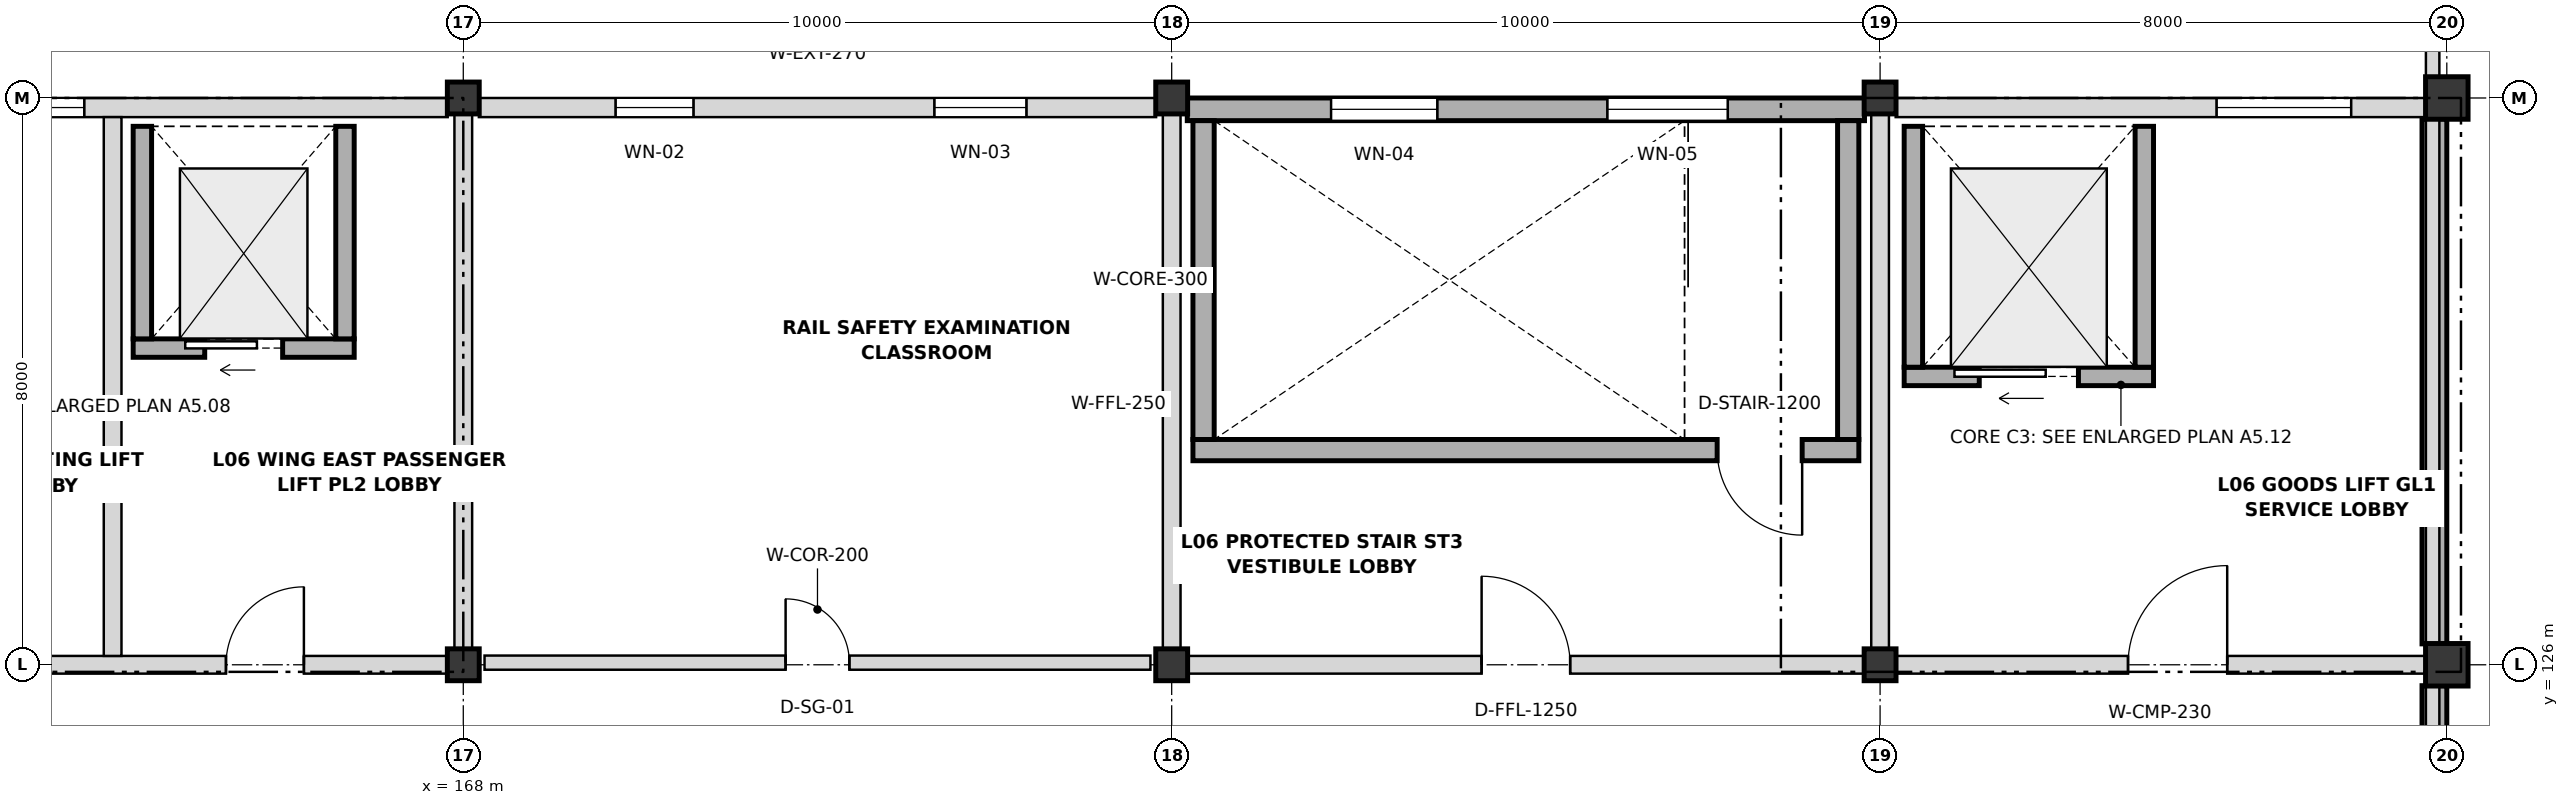
"""IFC4 building model, lengths in metres.
Left out: names, types, materials, properties, quantities, classifications, styles, units other than length and angle.
Written with IfcOpenShell. Run it as: python <this file> out.ifc"""

import sys

from ifc_helpers import new_model, si_unit, direction, frame, frame_2d, origin, origin_2d, place, context, subcontext, project, spatial, rectangle, extrude, element, fill, save


model = new_model("IFC4")
c1 = context("Model", 3, precision=1e-05, world=origin(), true_north=direction((0.0, 1.0)))
c2 = subcontext(c1, "Body", "Model", "MODEL_VIEW")
j1 = project(units=[si_unit("LENGTHUNIT", "METRE"), si_unit("PLANEANGLEUNIT", "RADIAN")], contexts=[c1])
p1 = place(None, origin())
s1 = spatial("IfcSite", under=j1, at=p1, CompositionType="ELEMENT")
p2 = place(p1, origin())
s2 = spatial("IfcBuilding", under=s1, at=p2, CompositionType="ELEMENT")
p3 = place(p2, frame((0.0, 0.0, 27.0)))
s3 = spatial("IfcBuildingStorey", under=s2, at=p3, CompositionType="ELEMENT", Elevation=27.0)
for number, where, z_axis, x_axis in (
    (1, (168.0, 126.0, 0.0), (0.0, 0.0, 1.0), (1.0, 0.0, 0.0)),
    (2, (168.0, 134.0, 0.0), (0.0, 0.0, 1.0), (1.0, 0.0, 0.0)),
    (3, (178.0, 126.0, 0.0), (0.0, 0.0, 1.0), (1.0, 0.0, 0.0)),
    (4, (178.0, 134.0, 0.0), (0.0, 0.0, 1.0), (1.0, 0.0, 0.0)),
    (5, (188.0, 126.0, 0.0), (0.0, 0.0, 1.0), (1.0, 0.0, 0.0)),
    (6, (188.0, 134.0, 0.0), (0.0, 0.0, 1.0), (1.0, 0.0, 0.0)),
):
    element("IfcColumn", number, at=place(p3, frame(where, z_axis=z_axis, x_axis=x_axis)), inside=s3, PredefinedType="COLUMN", context=c2, shape_type="SweptSolid", body=[
        extrude(rectangle(XDim=0.45, YDim=0.45, at=origin_2d()), origin(), (0.0, 0.0, 1.0), 4.2),
    ])
for number, where, z_axis, x_axis in (
    (7, (196.0, 126.0, 0.0), (0.0, 0.0, 1.0), (1.0, 0.0, 0.0)),
    (8, (196.0, 134.0, 0.0), (0.0, 0.0, 1.0), (1.0, 0.0, 0.0)),
):
    element("IfcColumn", number, at=place(p3, frame(where, z_axis=z_axis, x_axis=x_axis)), inside=s3, PredefinedType="COLUMN", context=c2, shape_type="SweptSolid", body=[
        extrude(rectangle(XDim=0.6, YDim=0.6, at=origin_2d()), origin(), (0.0, 0.0, 1.0), 4.2),
    ])
p4 = place(p3, frame((195.825, 125.705, 0.0), z_axis=(0.0, 0.0, 1.0), x_axis=(0.0, -1.0, 0.0)))
e9 = element("IfcWall", 9, at=p4, inside=s3, PredefinedType="SOLIDWALL", context=c2, shape_type="SweptSolid", body=[
    extrude(rectangle(XDim=11.41, YDim=0.35, at=frame_2d((5.705, 0.0))), origin(), (0.0, 0.0, 1.0), 4.2),
])
p5 = place(p3, frame((195.825, 133.705, 0.0), z_axis=(0.0, 0.0, 1.0), x_axis=(0.0, -1.0, 0.0)))
e10 = element("IfcWall", 10, at=p5, inside=s3, PredefinedType="SOLIDWALL", context=c2, shape_type="SweptSolid", body=[
    extrude(rectangle(XDim=7.41, YDim=0.35, at=frame_2d((3.705, 0.0))), origin(), (0.0, 0.0, 1.0), 4.2),
])
p6 = place(p3, frame((158.22, 133.865, 0.0), z_axis=(0.0, 0.0, 1.0), x_axis=(1.0, 0.0, 0.0)))
e11 = element("IfcWall", 11, at=p6, inside=s3, PredefinedType="SOLIDWALL", context=c2, shape_type="SweptSolid", body=[
    extrude(rectangle(XDim=9.56, YDim=0.27, at=frame_2d((4.78, 0.0))), origin(), (0.0, 0.0, 1.0), 3.218),
])
p7 = place(p6, frame((3.53, 0.0, 1.05)))
e12 = element("IfcOpeningElement", 12, at=p7, cuts=e11, PredefinedType="OPENING", context=c2, shape_type="SweptSolid", body=[
    extrude(rectangle(XDim=0.9, YDim=1.15, at=frame_2d((0.45, 0.575))), frame((0.0, 0.145, 0.0), z_axis=(0.0, -1.0, 0.0), x_axis=(1.0, 0.0, 0.0)), (0.0, 0.0, 1.0), 0.29),
])
p8 = place(p3, frame((168.22, 133.865, 0.0), z_axis=(0.0, 0.0, 1.0), x_axis=(1.0, 0.0, 0.0)))
e13 = element("IfcWall", 13, at=p8, inside=s3, PredefinedType="SOLIDWALL", context=c2, shape_type="SweptSolid", body=[
    extrude(rectangle(XDim=9.56, YDim=0.27, at=frame_2d((4.78, 0.0))), origin(), (0.0, 0.0, 1.0), 3.218),
])
p9 = place(p8, frame((1.93, 0.0, 1.05)))
e14 = element("IfcOpeningElement", 14, at=p9, cuts=e13, PredefinedType="OPENING", context=c2, shape_type="SweptSolid", body=[
    extrude(rectangle(XDim=1.1, YDim=1.15, at=frame_2d((0.55, 0.575))), frame((0.0, 0.145, 0.0), z_axis=(0.0, -1.0, 0.0), x_axis=(1.0, 0.0, 0.0)), (0.0, 0.0, 1.0), 0.29),
])
p10 = place(p8, frame((6.43, 0.0, 1.05)))
e15 = element("IfcOpeningElement", 15, at=p10, cuts=e13, PredefinedType="OPENING", context=c2, shape_type="SweptSolid", body=[
    extrude(rectangle(XDim=1.3, YDim=1.15, at=frame_2d((0.65, 0.575))), frame((0.0, 0.145, 0.0), z_axis=(0.0, -1.0, 0.0), x_axis=(1.0, 0.0, 0.0)), (0.0, 0.0, 1.0), 0.29),
])
p11 = place(p3, frame((178.22, 133.84, 0.0), z_axis=(0.0, 0.0, 1.0), x_axis=(1.0, 0.0, 0.0)))
e16 = element("IfcWall", 16, at=p11, inside=s3, PredefinedType="SHEAR", context=c2, shape_type="SweptSolid", body=[
    extrude(rectangle(XDim=9.56, YDim=0.32, at=frame_2d((4.78, 0.0))), origin(), (0.0, 0.0, 1.0), 4.2),
])
p12 = place(p11, frame((2.03, 0.0, 1.05)))
e17 = element("IfcOpeningElement", 17, at=p12, cuts=e16, PredefinedType="OPENING", context=c2, shape_type="SweptSolid", body=[
    extrude(rectangle(XDim=1.5, YDim=1.15, at=frame_2d((0.75, 0.575))), frame((0.0, 0.17, 0.0), z_axis=(0.0, -1.0, 0.0), x_axis=(1.0, 0.0, 0.0)), (0.0, 0.0, 1.0), 0.34),
])
p13 = place(p11, frame((5.93, 0.0, 1.05)))
e18 = element("IfcOpeningElement", 18, at=p13, cuts=e16, PredefinedType="OPENING", context=c2, shape_type="SweptSolid", body=[
    extrude(rectangle(XDim=1.7, YDim=1.15, at=frame_2d((0.85, 0.575))), frame((0.0, 0.17, 0.0), z_axis=(0.0, -1.0, 0.0), x_axis=(1.0, 0.0, 0.0)), (0.0, 0.0, 1.0), 0.34),
])
p14 = place(p3, frame((188.22, 133.865, 0.0), z_axis=(0.0, 0.0, 1.0), x_axis=(1.0, 0.0, 0.0)))
e19 = element("IfcWall", 19, at=p14, inside=s3, PredefinedType="SOLIDWALL", context=c2, shape_type="SweptSolid", body=[
    extrude(rectangle(XDim=7.485, YDim=0.27, at=frame_2d((3.743, 0.0))), origin(), (0.0, 0.0, 1.0), 3.218),
])
p15 = place(p14, frame((4.53, 0.0, 1.05)))
e20 = element("IfcOpeningElement", 20, at=p15, cuts=e19, PredefinedType="OPENING", context=c2, shape_type="SweptSolid", body=[
    extrude(rectangle(XDim=1.9, YDim=1.15, at=frame_2d((0.95, 0.575))), frame((0.0, 0.145, 0.0), z_axis=(0.0, -1.0, 0.0), x_axis=(1.0, 0.0, 0.0)), (0.0, 0.0, 1.0), 0.29),
])
p16 = place(p3, frame((195.8, 90.12, 4.2), z_axis=(0.0, 0.0, 1.0), x_axis=(0.0, 1.0, 0.0)))
e21 = element("IfcWall", 21, at=p16, inside=s3, PredefinedType="PARAPET", context=c2, shape_type="SweptSolid", body=[
    extrude(rectangle(XDim=45.68, YDim=0.19, at=frame_2d((22.84, 0.0))), origin(), (0.0, 0.0, 1.0), 0.95),
])
p17 = place(p3, frame((187.7, 129.03, 0.0), z_axis=(0.0, 0.0, 1.0), x_axis=(-1.0, 0.0, 0.0)))
e22 = element("IfcWall", 22, at=p17, inside=s3, PredefinedType="SHEAR", context=c2, shape_type="SweptSolid", body=[
    extrude(rectangle(XDim=9.4, YDim=0.3, at=frame_2d((4.7, 0.0))), origin(), (0.0, 0.0, 1.0), 3.98),
])
p18 = place(p17, frame((0.8, 0.0, 0.0)))
e23 = element("IfcOpeningElement", 23, at=p18, cuts=e22, PredefinedType="OPENING", context=c2, shape_type="SweptSolid", body=[
    extrude(rectangle(XDim=1.2, YDim=2.15, at=frame_2d((0.6, 1.075))), frame((0.0, 0.16, 0.0), z_axis=(0.0, -1.0, 0.0), x_axis=(1.0, 0.0, 0.0)), (0.0, 0.0, 1.0), 0.32),
])
for number, where, z_axis, x_axis in (
    (24, (187.55, 133.68, 0.0), (0.0, 0.0, 1.0), (0.0, -1.0, 0.0)),
    (25, (178.45, 129.18, 0.0), (0.0, 0.0, 1.0), (0.0, 1.0, 0.0)),
):
    element("IfcWall", number, at=place(p3, frame(where, z_axis=z_axis, x_axis=x_axis)), inside=s3, PredefinedType="SHEAR", context=c2, shape_type="SweptSolid", body=[
        extrude(rectangle(XDim=4.5, YDim=0.3, at=frame_2d((2.25, 0.0))), origin(), (0.0, 0.0, 1.0), 3.98),
    ])
p19 = place(p3, frame((163.34, 130.47, 0.0), z_axis=(0.0, 0.0, 1.0), x_axis=(1.0, 0.0, 0.0)))
e26 = element("IfcWall", 26, at=p19, inside=s3, PredefinedType="SHEAR", context=c2, shape_type="SweptSolid", body=[
    extrude(rectangle(XDim=3.12, YDim=0.26, at=frame_2d((1.56, 0.0))), origin(), (0.0, 0.0, 1.0), 3.98),
])
p20 = place(p19, frame((1.01, 0.0, 0.0)))
e27 = element("IfcOpeningElement", 27, at=p20, cuts=e26, PredefinedType="OPENING", context=c2, shape_type="SweptSolid", body=[
    extrude(rectangle(XDim=1.1, YDim=2.15, at=frame_2d((0.55, 1.075))), frame((0.0, 0.14, 0.0), z_axis=(0.0, -1.0, 0.0), x_axis=(1.0, 0.0, 0.0)), (0.0, 0.0, 1.0), 0.28),
])
for number, where, z_axis, x_axis in (
    (28, (163.47, 130.6, 0.0), (0.0, 0.0, 1.0), (0.0, 1.0, 0.0)),
    (29, (166.33, 130.6, 0.0), (0.0, 0.0, 1.0), (0.0, 1.0, 0.0)),
):
    element("IfcWall", number, at=place(p3, frame(where, z_axis=z_axis, x_axis=x_axis)), inside=s3, PredefinedType="SHEAR", context=c2, shape_type="SweptSolid", body=[
        extrude(rectangle(XDim=3.0, YDim=0.26, at=frame_2d((1.5, 0.0))), origin(), (0.0, 0.0, 1.0), 3.98),
    ])
p21 = place(p3, frame((188.34, 130.07, 0.0), z_axis=(0.0, 0.0, 1.0), x_axis=(1.0, 0.0, 0.0)))
e30 = element("IfcWall", 30, at=p21, inside=s3, PredefinedType="SHEAR", context=c2, shape_type="SweptSolid", body=[
    extrude(rectangle(XDim=3.52, YDim=0.26, at=frame_2d((1.76, 0.0))), origin(), (0.0, 0.0, 1.0), 3.98),
])
p22 = place(p21, frame((1.06, 0.0, 0.0)))
e31 = element("IfcOpeningElement", 31, at=p22, cuts=e30, PredefinedType="OPENING", context=c2, shape_type="SweptSolid", body=[
    extrude(rectangle(XDim=1.4, YDim=2.2, at=frame_2d((0.7, 1.1))), frame((0.0, 0.14, 0.0), z_axis=(0.0, -1.0, 0.0), x_axis=(1.0, 0.0, 0.0)), (0.0, 0.0, 1.0), 0.28),
])
for number, where, z_axis, x_axis in (
    (32, (188.47, 130.2, 0.0), (0.0, 0.0, 1.0), (0.0, 1.0, 0.0)),
    (33, (191.73, 130.2, 0.0), (0.0, 0.0, 1.0), (0.0, 1.0, 0.0)),
):
    element("IfcWall", number, at=place(p3, frame(where, z_axis=z_axis, x_axis=x_axis)), inside=s3, PredefinedType="SHEAR", context=c2, shape_type="SweptSolid", body=[
        extrude(rectangle(XDim=3.4, YDim=0.26, at=frame_2d((1.7, 0.0))), origin(), (0.0, 0.0, 1.0), 3.98),
    ])
p23 = place(p3, frame((158.23, 126.0, 0.0), z_axis=(0.0, 0.0, 1.0), x_axis=(1.0, 0.0, 0.0)))
e34 = element("IfcWall", 34, at=p23, inside=s3, PredefinedType="PARTITIONING", context=c2, shape_type="SweptSolid", body=[
    extrude(rectangle(XDim=9.54, YDim=0.25, at=frame_2d((4.77, 0.0))), origin(), (0.0, 0.0, 1.0), 3.218),
])
p24 = place(p23, frame((1.945, 0.0, 0.0)))
e35 = element("IfcOpeningElement", 35, at=p24, cuts=e34, PredefinedType="OPENING", context=c2, shape_type="SweptSolid", body=[
    extrude(rectangle(XDim=1.25, YDim=2.15, at=frame_2d((0.625, 1.075))), frame((0.0, 0.135, 0.0), z_axis=(0.0, -1.0, 0.0), x_axis=(1.0, 0.0, 0.0)), (0.0, 0.0, 1.0), 0.27),
])
p25 = place(p23, frame((6.42, 0.0, 0.0)))
e36 = element("IfcOpeningElement", 36, at=p25, cuts=e34, PredefinedType="OPENING", context=c2, shape_type="SweptSolid", body=[
    extrude(rectangle(XDim=1.1, YDim=2.15, at=frame_2d((0.55, 1.075))), frame((0.0, 0.135, 0.0), z_axis=(0.0, -1.0, 0.0), x_axis=(1.0, 0.0, 0.0)), (0.0, 0.0, 1.0), 0.27),
])
p26 = place(p3, frame((178.23, 126.0, 0.0), z_axis=(0.0, 0.0, 1.0), x_axis=(1.0, 0.0, 0.0)))
e37 = element("IfcWall", 37, at=p26, inside=s3, PredefinedType="PARTITIONING", context=c2, shape_type="SweptSolid", body=[
    extrude(rectangle(XDim=9.54, YDim=0.25, at=frame_2d((4.77, 0.0))), origin(), (0.0, 0.0, 1.0), 3.218),
])
p27 = place(p26, frame((4.145, 0.0, 0.0)))
e38 = element("IfcOpeningElement", 38, at=p27, cuts=e37, PredefinedType="OPENING", context=c2, shape_type="SweptSolid", body=[
    extrude(rectangle(XDim=1.25, YDim=2.15, at=frame_2d((0.625, 1.075))), frame((0.0, 0.135, 0.0), z_axis=(0.0, -1.0, 0.0), x_axis=(1.0, 0.0, 0.0)), (0.0, 0.0, 1.0), 0.27),
])
p28 = place(p3, frame((188.23, 126.0, 0.0), z_axis=(0.0, 0.0, 1.0), x_axis=(1.0, 0.0, 0.0)))
e39 = element("IfcWall", 39, at=p28, inside=s3, PredefinedType="PARTITIONING", context=c2, shape_type="SweptSolid", body=[
    extrude(rectangle(XDim=7.465, YDim=0.25, at=frame_2d((3.732, 0.0))), origin(), (0.0, 0.0, 1.0), 3.218),
])
p29 = place(p28, frame((3.27, 0.0, 0.0)))
e40 = element("IfcOpeningElement", 40, at=p29, cuts=e39, PredefinedType="OPENING", context=c2, shape_type="SweptSolid", body=[
    extrude(rectangle(XDim=1.4, YDim=2.2, at=frame_2d((0.7, 1.1))), frame((0.0, 0.135, 0.0), z_axis=(0.0, -1.0, 0.0), x_axis=(1.0, 0.0, 0.0)), (0.0, 0.0, 1.0), 0.27),
])
p30 = place(p3, frame((163.05, 126.125, 0.0), z_axis=(0.0, 0.0, 1.0), x_axis=(0.0, 1.0, 0.0)))
e41 = element("IfcWall", 41, at=p30, inside=s3, PredefinedType="PARTITIONING", context=c2, shape_type="SweptSolid", body=[
    extrude(rectangle(XDim=7.605, YDim=0.25, at=frame_2d((3.802, 0.0))), origin(), (0.0, 0.0, 1.0), 3.218),
])
for number, where, z_axis, x_axis in (
    (42, (168.0, 126.23, 0.0), (0.0, 0.0, 1.0), (0.0, 1.0, 0.0)),
    (43, (178.0, 126.23, 0.0), (0.0, 0.0, 1.0), (0.0, 1.0, 0.0)),
    (44, (188.0, 126.23, 0.0), (0.0, 0.0, 1.0), (0.0, 1.0, 0.0)),
):
    element("IfcWall", number, at=place(p3, frame(where, z_axis=z_axis, x_axis=x_axis)), inside=s3, PredefinedType="PARTITIONING", context=c2, shape_type="SweptSolid", body=[
        extrude(rectangle(XDim=7.54, YDim=0.25, at=frame_2d((3.77, 0.0))), origin(), (0.0, 0.0, 1.0), 3.218),
    ])
p31 = place(p3, frame((168.3, 126.03, 0.0), z_axis=(0.0, 0.0, 1.0), x_axis=(1.0, 0.0, 0.0)))
e45 = element("IfcWall", 45, at=p31, inside=s3, PredefinedType="PARTITIONING", context=c2, shape_type="SweptSolid", body=[
    extrude(rectangle(XDim=9.4, YDim=0.2, at=frame_2d((4.7, 0.0))), origin(), (0.0, 0.0, 1.0), 3.218),
])
p32 = place(p31, frame((4.25, 0.0, 0.0)))
e46 = element("IfcOpeningElement", 46, at=p32, cuts=e45, PredefinedType="OPENING", context=c2, shape_type="SweptSolid", body=[
    extrude(rectangle(XDim=0.9, YDim=2.1, at=frame_2d((0.45, 1.05))), frame((0.0, 0.11, 0.0), z_axis=(0.0, -1.0, 0.0), x_axis=(1.0, 0.0, 0.0)), (0.0, 0.0, 1.0), 0.22),
])
p33 = place(p7, origin())
e47 = element("IfcWindow", 47, at=p33, inside=s3, PartitioningType="SINGLE_PANEL", PredefinedType="WINDOW", context=c2, shape_type="SweptSolid", body=[
    extrude(rectangle(XDim=0.9, YDim=1.15, at=frame_2d((0.45, 0.575))), frame((0.0, 0.03, 0.0), z_axis=(0.0, -1.0, 0.0), x_axis=(1.0, 0.0, 0.0)), (0.0, 0.0, 1.0), 0.06),
])
fill(e12, e47)
p34 = place(p9, origin())
e48 = element("IfcWindow", 48, at=p34, inside=s3, PartitioningType="SINGLE_PANEL", PredefinedType="WINDOW", context=c2, shape_type="SweptSolid", body=[
    extrude(rectangle(XDim=1.1, YDim=1.15, at=frame_2d((0.55, 0.575))), frame((0.0, 0.03, 0.0), z_axis=(0.0, -1.0, 0.0), x_axis=(1.0, 0.0, 0.0)), (0.0, 0.0, 1.0), 0.06),
])
fill(e14, e48)
p35 = place(p10, origin())
e49 = element("IfcWindow", 49, at=p35, inside=s3, PartitioningType="SINGLE_PANEL", PredefinedType="WINDOW", context=c2, shape_type="SweptSolid", body=[
    extrude(rectangle(XDim=1.3, YDim=1.15, at=frame_2d((0.65, 0.575))), frame((0.0, 0.03, 0.0), z_axis=(0.0, -1.0, 0.0), x_axis=(1.0, 0.0, 0.0)), (0.0, 0.0, 1.0), 0.06),
])
fill(e15, e49)
p36 = place(p12, origin())
e50 = element("IfcWindow", 50, at=p36, inside=s3, PartitioningType="SINGLE_PANEL", PredefinedType="WINDOW", context=c2, shape_type="SweptSolid", body=[
    extrude(rectangle(XDim=1.5, YDim=1.15, at=frame_2d((0.75, 0.575))), frame((0.0, 0.03, 0.0), z_axis=(0.0, -1.0, 0.0), x_axis=(1.0, 0.0, 0.0)), (0.0, 0.0, 1.0), 0.06),
])
fill(e17, e50)
p37 = place(p13, origin())
e51 = element("IfcWindow", 51, at=p37, inside=s3, PartitioningType="SINGLE_PANEL", PredefinedType="WINDOW", context=c2, shape_type="SweptSolid", body=[
    extrude(rectangle(XDim=1.7, YDim=1.15, at=frame_2d((0.85, 0.575))), frame((0.0, 0.03, 0.0), z_axis=(0.0, -1.0, 0.0), x_axis=(1.0, 0.0, 0.0)), (0.0, 0.0, 1.0), 0.06),
])
fill(e18, e51)
p38 = place(p15, origin())
e52 = element("IfcWindow", 52, at=p38, inside=s3, PartitioningType="SINGLE_PANEL", PredefinedType="WINDOW", context=c2, shape_type="SweptSolid", body=[
    extrude(rectangle(XDim=1.9, YDim=1.15, at=frame_2d((0.95, 0.575))), frame((0.0, 0.03, 0.0), z_axis=(0.0, -1.0, 0.0), x_axis=(1.0, 0.0, 0.0)), (0.0, 0.0, 1.0), 0.06),
])
fill(e20, e52)
p39 = place(p18, origin())
e53 = element("IfcDoor", 53, at=p39, inside=s3, OperationType="SINGLE_SWING_LEFT", PredefinedType="DOOR", context=c2, shape_type="SweptSolid", body=[
    extrude(rectangle(XDim=1.2, YDim=2.15, at=frame_2d((0.6, 1.075))), frame((0.0, 0.025, 0.0), z_axis=(0.0, -1.0, 0.0), x_axis=(1.0, 0.0, 0.0)), (0.0, 0.0, 1.0), 0.05),
])
fill(e23, e53)
p40 = place(p20, origin())
e54 = element("IfcDoor", 54, at=p40, inside=s3, OperationType="SLIDING_TO_LEFT", PredefinedType="DOOR", context=c2, shape_type="SweptSolid", body=[
    extrude(rectangle(XDim=1.1, YDim=2.15, at=frame_2d((0.55, 1.075))), frame((0.0, 0.025, 0.0), z_axis=(0.0, -1.0, 0.0), x_axis=(1.0, 0.0, 0.0)), (0.0, 0.0, 1.0), 0.05),
])
fill(e27, e54)
p41 = place(p22, origin())
e55 = element("IfcDoor", 55, at=p41, inside=s3, OperationType="SLIDING_TO_LEFT", PredefinedType="DOOR", context=c2, shape_type="SweptSolid", body=[
    extrude(rectangle(XDim=1.4, YDim=2.2, at=frame_2d((0.7, 1.1))), frame((0.0, 0.025, 0.0), z_axis=(0.0, -1.0, 0.0), x_axis=(1.0, 0.0, 0.0)), (0.0, 0.0, 1.0), 0.05),
])
fill(e31, e55)
p42 = place(p25, origin())
e56 = element("IfcDoor", 56, at=p42, inside=s3, OperationType="SINGLE_SWING_RIGHT", PredefinedType="DOOR", context=c2, shape_type="SweptSolid", body=[
    extrude(rectangle(XDim=1.1, YDim=2.15, at=frame_2d((0.55, 1.075))), frame((0.0, 0.025, 0.0), z_axis=(0.0, -1.0, 0.0), x_axis=(1.0, 0.0, 0.0)), (0.0, 0.0, 1.0), 0.05),
])
fill(e36, e56)
p43 = place(p27, origin())
e57 = element("IfcDoor", 57, at=p43, inside=s3, OperationType="SINGLE_SWING_LEFT", PredefinedType="DOOR", context=c2, shape_type="SweptSolid", body=[
    extrude(rectangle(XDim=1.25, YDim=2.15, at=frame_2d((0.625, 1.075))), frame((0.0, 0.025, 0.0), z_axis=(0.0, -1.0, 0.0), x_axis=(1.0, 0.0, 0.0)), (0.0, 0.0, 1.0), 0.05),
])
fill(e38, e57)
p44 = place(p29, origin())
e58 = element("IfcDoor", 58, at=p44, inside=s3, OperationType="SINGLE_SWING_RIGHT", PredefinedType="DOOR", context=c2, shape_type="SweptSolid", body=[
    extrude(rectangle(XDim=1.4, YDim=2.2, at=frame_2d((0.7, 1.1))), frame((0.0, 0.025, 0.0), z_axis=(0.0, -1.0, 0.0), x_axis=(1.0, 0.0, 0.0)), (0.0, 0.0, 1.0), 0.05),
])
fill(e40, e58)
p45 = place(p32, origin())
e59 = element("IfcDoor", 59, at=p45, inside=s3, OperationType="SINGLE_SWING_LEFT", PredefinedType="DOOR", context=c2, shape_type="SweptSolid", body=[
    extrude(rectangle(XDim=0.9, YDim=2.1, at=frame_2d((0.45, 1.05))), frame((0.0, 0.025, 0.0), z_axis=(0.0, -1.0, 0.0), x_axis=(1.0, 0.0, 0.0)), (0.0, 0.0, 1.0), 0.05),
])
fill(e46, e59)
save(model, sys.argv[1])
